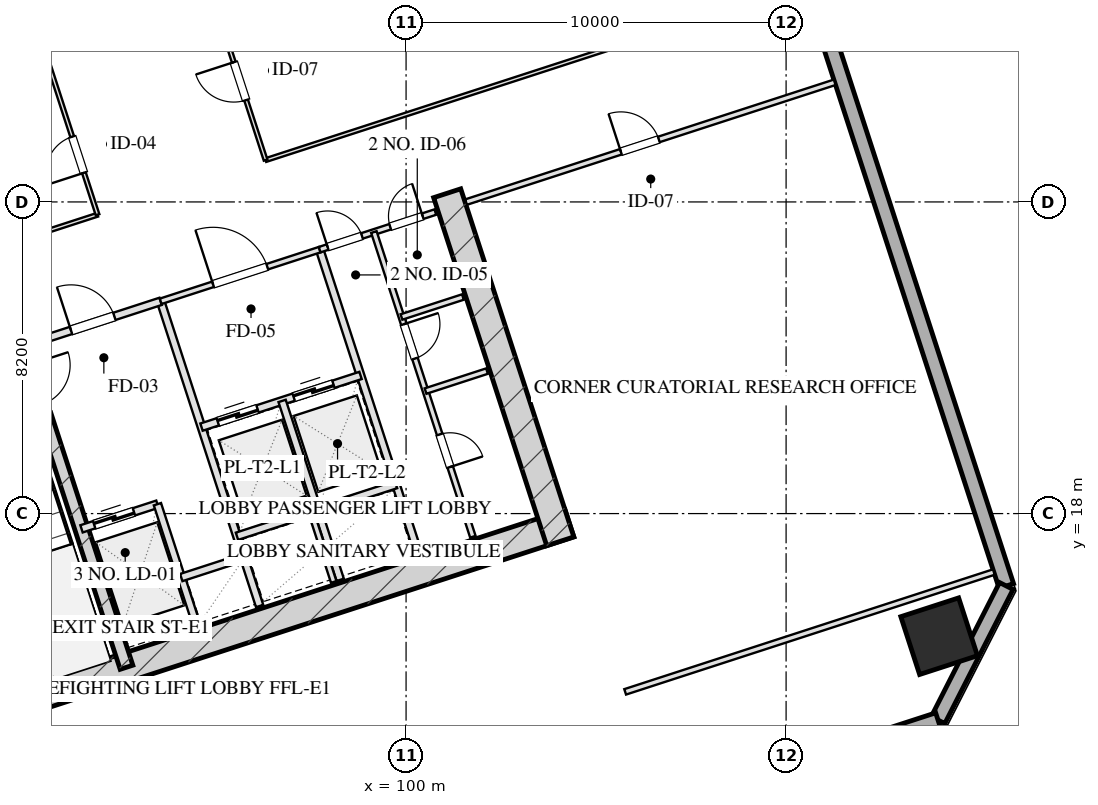
"""IFC4 building model, lengths in metres.
Left out: names, types, materials, properties, quantities, classifications, styles, units other than length and angle.
Written with IfcOpenShell. Run it as: python <this file> out.ifc"""

import sys

from ifc_helpers import new_model, si_unit, direction, frame, frame_2d, origin, origin_2d, place, context, subcontext, project, spatial, rectangle, hollow_rectangle, extrude, element, fill, save


model = new_model("IFC4")
c1 = context("Model", 3, precision=1e-05, world=origin(), true_north=direction((0.0, 1.0)))
c2 = subcontext(c1, "Body", "Model", "MODEL_VIEW")
j1 = project(units=[si_unit("LENGTHUNIT", "METRE"), si_unit("PLANEANGLEUNIT", "RADIAN")], contexts=[c1])
p1 = place(None, origin())
s1 = spatial("IfcSite", under=j1, at=p1, CompositionType="ELEMENT")
p2 = place(p1, origin())
s2 = spatial("IfcBuilding", under=s1, at=p2, CompositionType="ELEMENT")
p3 = place(p2, frame((0.0, 0.0, 42.0)))
s3 = spatial("IfcBuildingStorey", under=s2, at=p3, CompositionType="ELEMENT", Elevation=42.0)
p4 = place(p3, frame((88.559, 12.629, 0.0), z_axis=(0.0, 0.0, 1.0), x_axis=(0.951056072937, 0.309018358888, 0.0)))
e1 = element("IfcWall", 1, at=p4, inside=s3, PredefinedType="SHEAR", context=c2, shape_type="SweptSolid", body=[
    extrude(rectangle(XDim=16.55, YDim=0.75, at=frame_2d((8.275, 0.0))), origin(), (0.0, 0.0, 1.0), 4.0),
])
p5 = place(p3, frame((101.082, 26.429, 0.0), z_axis=(0.0, 0.0, 1.0), x_axis=(0.309016134813, -0.951056795583, 0.0)))
e2 = element("IfcWall", 2, at=p5, inside=s3, PredefinedType="SHEAR", context=c2, shape_type="SweptSolid", body=[
    extrude(rectangle(XDim=9.63, YDim=0.75, at=frame_2d((4.815, 0.0))), origin(), (0.0, 0.0, 1.0), 4.0),
])
p6 = place(p3, frame((90.486, 20.594, 0.0), z_axis=(0.0, 0.0, 1.0), x_axis=(0.309020428229, -0.951055400562, 0.0)))
e3 = element("IfcWall", 3, at=p6, inside=s3, PredefinedType="SHEAR", context=c2, shape_type="SweptSolid", body=[
    extrude(rectangle(XDim=6.98, YDim=0.35, at=frame_2d((3.49, 0.0))), origin(), (0.0, 0.0, 1.0), 4.0),
])
p7 = place(p3, frame((114.027, 14.774, 0.0), z_axis=(0.0, 0.0, 1.0), x_axis=(0.951056516295, 0.309016994375, 0.0)))
e4 = element("IfcColumn", 4, at=p7, inside=s3, PredefinedType="COLUMN", context=c2, shape_type="SweptSolid", body=[
    extrude(hollow_rectangle(XDim=1.6, YDim=1.6, WallThickness=0.055, at=origin_2d()), origin(), (0.0, 0.0, 1.0), 4.001),
])
p8 = place(p3, frame((100.345, 63.648, 0.0), z_axis=(0.0, 0.0, 1.0), x_axis=(0.309014526607, -0.951057318118, 0.0)))
e5 = element("IfcWall", 5, at=p8, inside=s3, PredefinedType="SOLIDWALL", context=c2, shape_type="SweptSolid", body=[
    extrude(rectangle(XDim=50.0, YDim=0.4, at=frame_2d((25.0, 0.0))), origin(), (0.0, 0.0, 1.0), 3.1),
])
p9 = place(p8, frame((30.15, 0.0, 0.75)))
e6 = element("IfcOpeningElement", 6, at=p9, cuts=e5, PredefinedType="OPENING", context=c2, shape_type="SweptSolid", body=[
    extrude(rectangle(XDim=2.5, YDim=1.75, at=frame_2d((1.25, 0.875))), frame((0.0, 0.21, 0.0), z_axis=(0.0, -1.0, 0.0), x_axis=(1.0, 0.0, 0.0)), (0.0, 0.0, 1.0), 0.42),
])
p10 = place(p8, frame((17.35, 0.0, 0.75)))
e7 = element("IfcOpeningElement", 7, at=p10, cuts=e5, PredefinedType="OPENING", context=c2, shape_type="SweptSolid", body=[
    extrude(rectangle(XDim=2.5, YDim=1.75, at=frame_2d((1.25, 0.875))), frame((0.0, 0.21, 0.0), z_axis=(0.0, -1.0, 0.0), x_axis=(1.0, 0.0, 0.0)), (0.0, 0.0, 1.0), 0.42),
])
p11 = place(p3, frame((115.795, 16.095, 0.0), z_axis=(0.0, 0.0, 1.0), x_axis=(-0.453958106755, -0.891023028497, 0.0)))
e8 = element("IfcWall", 8, at=p11, inside=s3, PredefinedType="SOLIDWALL", context=c2, shape_type="SweptSolid", body=[
    extrude(rectangle(XDim=3.96, YDim=0.4, at=frame_2d((1.98, 0.0))), origin(), (0.0, 0.0, 1.0), 3.1),
])
p12 = place(p3, frame((113.998, 12.567, 0.0), z_axis=(0.0, 0.0, 1.0), x_axis=(-0.951055939317, -0.309018770125, 0.0)))
e9 = element("IfcWall", 9, at=p12, inside=s3, PredefinedType="SOLIDWALL", context=c2, shape_type="SweptSolid", body=[
    extrude(rectangle(XDim=32.4, YDim=0.4, at=frame_2d((16.2, 0.0))), origin(), (0.0, 0.0, 1.0), 3.1),
])
p13 = place(p3, frame((93.542, 23.585, 0.0), z_axis=(0.0, 0.0, 1.0), x_axis=(0.309042196757, -0.951048327176, 0.0)))
e10 = element("IfcWall", 10, at=p13, inside=s3, PredefinedType="PARTITIONING", context=c2, shape_type="SweptSolid", body=[
    extrude(rectangle(XDim=8.43, YDim=0.2, at=frame_2d((4.215, 0.0))), origin(), (0.0, 0.0, 1.0), 3.705),
])
p14 = place(p3, frame((89.899, 22.401, 0.0), z_axis=(0.0, 0.0, 1.0), x_axis=(0.951046716504, 0.309047153403, 0.0)))
e11 = element("IfcWall", 11, at=p14, inside=s3, PredefinedType="PARTITIONING", context=c2, shape_type="SweptSolid", body=[
    extrude(rectangle(XDim=3.83, YDim=0.2, at=frame_2d((1.915, 0.0))), origin(), (0.0, 0.0, 1.0), 3.705),
])
p15 = place(p14, frame((1.35, 0.0, 0.0)))
e12 = element("IfcOpeningElement", 12, at=p15, cuts=e11, PredefinedType="OPENING", context=c2, shape_type="SweptSolid", body=[
    extrude(rectangle(XDim=1.2, YDim=2.05, at=frame_2d((0.6, 1.025))), frame((0.0, 0.11, 0.0), z_axis=(0.0, -1.0, 0.0), x_axis=(1.0, 0.0, 0.0)), (0.0, 0.0, 1.0), 0.22),
])
p16 = place(p3, frame((91.46, 17.598, 0.0), z_axis=(0.0, 0.0, 1.0), x_axis=(0.951062257173, 0.308999325213, 0.0)))
e13 = element("IfcWall", 13, at=p16, inside=s3, PredefinedType="PARTITIONING", context=c2, shape_type="SweptSolid", body=[
    extrude(rectangle(XDim=2.1, YDim=0.2, at=frame_2d((1.05, 0.0))), origin(), (0.0, 0.0, 1.0), 3.705),
])
p17 = place(p16, frame((0.35, 0.0, 0.0)))
e14 = element("IfcOpeningElement", 14, at=p17, cuts=e13, PredefinedType="OPENING", context=c2, shape_type="SweptSolid", body=[
    extrude(rectangle(XDim=1.1, YDim=2.05, at=frame_2d((0.55, 1.025))), frame((0.0, 0.11, 0.0), z_axis=(0.0, -1.0, 0.0), x_axis=(1.0, 0.0, 0.0)), (0.0, 0.0, 1.0), 0.22),
])
p18 = place(p3, frame((93.457, 18.247, 0.0), z_axis=(0.0, 0.0, 1.0), x_axis=(0.3089935693, -0.951064127245, 0.0)))
e15 = element("IfcWall", 15, at=p18, inside=s3, PredefinedType="PARTITIONING", context=c2, shape_type="SweptSolid", body=[
    extrude(rectangle(XDim=3.7, YDim=0.2, at=frame_2d((1.85, 0.0))), origin(), (0.0, 0.0, 1.0), 3.705),
])
p19 = place(p3, frame((94.084, 16.317, 0.0), z_axis=(0.0, 0.0, 1.0), x_axis=(0.951041328149, 0.309063734775, 0.0)))
e16 = element("IfcWall", 16, at=p19, inside=s3, PredefinedType="PARTITIONING", context=c2, shape_type="SweptSolid", body=[
    extrude(rectangle(XDim=1.73, YDim=0.2, at=frame_2d((0.865, 0.0))), origin(), (0.0, 0.0, 1.0), 3.705),
])
p20 = place(p3, frame((97.727, 24.944, 0.0), z_axis=(0.0, 0.0, 1.0), x_axis=(0.309016001439, -0.951056838919, 0.0)))
e17 = element("IfcWall", 17, at=p20, inside=s3, PredefinedType="PARTITIONING", context=c2, shape_type="SweptSolid", body=[
    extrude(rectangle(XDim=8.43, YDim=0.2, at=frame_2d((4.215, 0.0))), origin(), (0.0, 0.0, 1.0), 3.705),
])
p21 = place(p3, frame((93.542, 23.585, 0.0), z_axis=(0.0, 0.0, 1.0), x_axis=(0.951063829732, 0.308994485023, 0.0)))
e18 = element("IfcWall", 18, at=p21, inside=s3, PredefinedType="PARTITIONING", context=c2, shape_type="SweptSolid", body=[
    extrude(rectangle(XDim=4.4, YDim=0.15, at=frame_2d((2.2, 0.0))), origin(), (0.0, 0.0, 1.0), 3.705),
])
p22 = place(p21, frame((1.45, 0.0, 0.0)))
e19 = element("IfcOpeningElement", 19, at=p22, cuts=e18, PredefinedType="OPENING", context=c2, shape_type="SweptSolid", body=[
    extrude(rectangle(XDim=1.5, YDim=2.05, at=frame_2d((0.75, 1.025))), frame((0.0, 0.085, 0.0), z_axis=(0.0, -1.0, 0.0), x_axis=(1.0, 0.0, 0.0)), (0.0, 0.0, 1.0), 0.17),
])
p23 = place(p3, frame((94.617, 20.275, 0.0), z_axis=(0.0, 0.0, 1.0), x_axis=(0.951058531764, 0.30901079133, 0.0)))
e20 = element("IfcWall", 20, at=p23, inside=s3, PredefinedType="PARTITIONING", context=c2, shape_type="SweptSolid", body=[
    extrude(rectangle(XDim=4.4, YDim=0.2, at=frame_2d((2.2, 0.0))), origin(), (0.0, 0.0, 1.0), 3.705),
])
p24 = place(p23, frame((0.45, 0.0, 0.0)))
e21 = element("IfcOpeningElement", 21, at=p24, cuts=e20, PredefinedType="OPENING", context=c2, shape_type="SweptSolid", body=[
    extrude(rectangle(XDim=1.1, YDim=2.05, at=frame_2d((0.55, 1.025))), frame((0.0, 0.11, 0.0), z_axis=(0.0, -1.0, 0.0), x_axis=(1.0, 0.0, 0.0)), (0.0, 0.0, 1.0), 0.22),
])
p25 = place(p23, frame((2.55, 0.0, 0.0)))
e22 = element("IfcOpeningElement", 22, at=p25, cuts=e20, PredefinedType="OPENING", context=c2, shape_type="SweptSolid", body=[
    extrude(rectangle(XDim=1.1, YDim=2.05, at=frame_2d((0.55, 1.025))), frame((0.0, 0.11, 0.0), z_axis=(0.0, -1.0, 0.0), x_axis=(1.0, 0.0, 0.0)), (0.0, 0.0, 1.0), 0.22),
])
p26 = place(p3, frame((96.738, 20.964, 0.0), z_axis=(0.0, 0.0, 1.0), x_axis=(0.309042578481, -0.951048203135, 0.0)))
e23 = element("IfcWall", 23, at=p26, inside=s3, PredefinedType="PARTITIONING", context=c2, shape_type="SweptSolid", body=[
    extrude(rectangle(XDim=4.95, YDim=0.2, at=frame_2d((2.475, 0.0))), origin(), (0.0, 0.0, 1.0), 3.705),
])
p27 = place(p3, frame((95.551, 17.403, 0.0), z_axis=(0.0, 0.0, 1.0), x_axis=(0.951058531764, 0.30901079133, 0.0)))
e24 = element("IfcWall", 24, at=p27, inside=s3, PredefinedType="PARTITIONING", context=c2, shape_type="SweptSolid", body=[
    extrude(rectangle(XDim=4.4, YDim=0.2, at=frame_2d((2.2, 0.0))), origin(), (0.0, 0.0, 1.0), 3.705),
])
p28 = place(p3, frame((97.516, 17.989, 0.0), z_axis=(0.0, 0.0, 1.0), x_axis=(0.30897153969, -0.951071284217, 0.0)))
e25 = element("IfcWall", 25, at=p28, inside=s3, PredefinedType="PARTITIONING", context=c2, shape_type="SweptSolid", body=[
    extrude(rectangle(XDim=1.88, YDim=0.15, at=frame_2d((0.94, 0.0))), origin(), (0.0, 0.0, 1.0), 3.705),
])
p29 = place(p3, frame((97.727, 24.944, 0.0), z_axis=(0.0, 0.0, 1.0), x_axis=(0.951036872128, 0.309077446369, 0.0)))
e26 = element("IfcWall", 26, at=p29, inside=s3, PredefinedType="PARTITIONING", context=c2, shape_type="SweptSolid", body=[
    extrude(rectangle(XDim=3.2, YDim=0.15, at=frame_2d((1.6, 0.0))), origin(), (0.0, 0.0, 1.0), 3.705),
])
p30 = place(p29, frame((0.22, 0.0, 0.0)))
e27 = element("IfcOpeningElement", 27, at=p30, cuts=e26, PredefinedType="OPENING", context=c2, shape_type="SweptSolid", body=[
    extrude(rectangle(XDim=0.95, YDim=2.05, at=frame_2d((0.475, 1.025))), frame((0.0, 0.085, 0.0), z_axis=(0.0, -1.0, 0.0), x_axis=(1.0, 0.0, 0.0)), (0.0, 0.0, 1.0), 0.17),
])
p31 = place(p29, frame((1.95, 0.0, 0.0)))
e28 = element("IfcOpeningElement", 28, at=p31, cuts=e26, PredefinedType="OPENING", context=c2, shape_type="SweptSolid", body=[
    extrude(rectangle(XDim=0.9, YDim=2.05, at=frame_2d((0.45, 1.025))), frame((0.0, 0.085, 0.0), z_axis=(0.0, -1.0, 0.0), x_axis=(1.0, 0.0, 0.0)), (0.0, 0.0, 1.0), 0.17),
])
p32 = place(p3, frame((99.153, 25.408, 0.0), z_axis=(0.0, 0.0, 1.0), x_axis=(0.309016001439, -0.951056838919, 0.0)))
e29 = element("IfcWall", 29, at=p32, inside=s3, PredefinedType="PARTITIONING", context=c2, shape_type="SweptSolid", body=[
    extrude(rectangle(XDim=8.43, YDim=0.15, at=frame_2d((4.215, 0.0))), origin(), (0.0, 0.0, 1.0), 3.705),
])
p33 = place(p32, frame((2.55, 0.0, 0.0)))
e30 = element("IfcOpeningElement", 30, at=p33, cuts=e29, PredefinedType="OPENING", context=c2, shape_type="SweptSolid", body=[
    extrude(rectangle(XDim=0.95, YDim=2.05, at=frame_2d((0.475, 1.025))), frame((0.0, 0.085, 0.0), z_axis=(0.0, -1.0, 0.0), x_axis=(1.0, 0.0, 0.0)), (0.0, 0.0, 1.0), 0.17),
])
p34 = place(p32, frame((5.6, 0.0, 0.0)))
e31 = element("IfcOpeningElement", 31, at=p34, cuts=e29, PredefinedType="OPENING", context=c2, shape_type="SweptSolid", body=[
    extrude(rectangle(XDim=0.9, YDim=2.05, at=frame_2d((0.45, 1.025))), frame((0.0, 0.085, 0.0), z_axis=(0.0, -1.0, 0.0), x_axis=(1.0, 0.0, 0.0)), (0.0, 0.0, 1.0), 0.17),
])
for number, where, z_axis, x_axis in (
    (32, (100.513, 21.223, 0.0), (0.0, 0.0, 1.0), (0.951, 0.309, 0.0)),
    (33, (99.879, 23.173, 0.0), (0.0, 0.0, 1.0), (0.951, 0.309, 0.0)),
):
    element("IfcWall", number, at=place(p3, frame(where, z_axis=z_axis, x_axis=x_axis)), inside=s3, PredefinedType="PARTITIONING", context=c2, shape_type="SweptSolid", body=[
        extrude(rectangle(XDim=1.7, YDim=0.15, at=frame_2d((0.85, 0.0))), origin(), (0.0, 0.0, 1.0), 3.705),
    ])
p35 = place(p3, frame((105.765, 13.309, 0.0), z_axis=(0.0, 0.0, 1.0), x_axis=(0.951054294345, 0.309023832749, 0.0)))
e34 = element("IfcWall", 34, at=p35, inside=s3, PredefinedType="PARTITIONING", context=c2, shape_type="SweptSolid", body=[
    extrude(rectangle(XDim=10.2, YDim=0.15, at=frame_2d((5.1, 0.0))), origin(), (0.0, 0.0, 1.0), 3.705),
])
p36 = place(p3, frame((101.578, 26.196, 0.0), z_axis=(0.0, 0.0, 1.0), x_axis=(0.951059043131, 0.309009217467, 0.0)))
e35 = element("IfcWall", 35, at=p36, inside=s3, PredefinedType="PARTITIONING", context=c2, shape_type="SweptSolid", body=[
    extrude(rectangle(XDim=10.2, YDim=0.15, at=frame_2d((5.1, 0.0))), origin(), (0.0, 0.0, 1.0), 3.705),
])
p37 = place(p36, frame((4.284, 0.0, 0.0)))
e36 = element("IfcOpeningElement", 36, at=p37, cuts=e35, PredefinedType="OPENING", context=c2, shape_type="SweptSolid", body=[
    extrude(rectangle(XDim=1.05, YDim=2.05, at=frame_2d((0.525, 1.025))), frame((0.0, 0.085, 0.0), z_axis=(0.0, -1.0, 0.0), x_axis=(1.0, 0.0, 0.0)), (0.0, 0.0, 1.0), 0.17),
])
p38 = place(p3, frame((74.691, 20.278, 0.0), z_axis=(0.0, 0.0, 1.0), x_axis=(0.951053521786, 0.309026210375, 0.0)))
e37 = element("IfcWall", 37, at=p38, inside=s3, PredefinedType="MOVABLE", context=c2, shape_type="SweptSolid", body=[
    extrude(rectangle(XDim=18.075, YDim=0.1, at=frame_2d((9.038, 0.0))), origin(), (0.0, 0.0, 1.0), 3.705),
])
p39 = place(p3, frame((96.304, 27.3, 0.0), z_axis=(0.0, 0.0, 1.0), x_axis=(0.951055535739, 0.309020012199, 0.0)))
e38 = element("IfcWall", 38, at=p39, inside=s3, PredefinedType="MOVABLE", context=c2, shape_type="SweptSolid", body=[
    extrude(rectangle(XDim=14.875, YDim=0.1, at=frame_2d((7.438, 0.0))), origin(), (0.0, 0.0, 1.0), 3.705),
])
p40 = place(p3, frame((91.882, 25.863, 0.0), z_axis=(0.0, 0.0, 1.0), x_axis=(-0.309022042254, 0.951054876125, 0.0)))
e39 = element("IfcWall", 39, at=p40, inside=s3, PredefinedType="MOVABLE", context=c2, shape_type="SweptSolid", body=[
    extrude(rectangle(XDim=16.64, YDim=0.1, at=frame_2d((8.32, 0.0))), origin(), (0.0, 0.0, 1.0), 3.705),
])
p41 = place(p40, frame((1.16, 0.0, 0.0)))
e40 = element("IfcOpeningElement", 40, at=p41, cuts=e39, PredefinedType="OPENING", context=c2, shape_type="SweptSolid", body=[
    extrude(rectangle(XDim=1.0, YDim=2.05, at=frame_2d((0.5, 1.025))), frame((0.0, 0.06, 0.0), z_axis=(0.0, -1.0, 0.0), x_axis=(1.0, 0.0, 0.0)), (0.0, 0.0, 1.0), 0.12),
])
p42 = place(p40, frame((6.16, 0.0, 0.0)))
e41 = element("IfcOpeningElement", 41, at=p42, cuts=e39, PredefinedType="OPENING", context=c2, shape_type="SweptSolid", body=[
    extrude(rectangle(XDim=1.0, YDim=2.05, at=frame_2d((0.5, 1.025))), frame((0.0, 0.06, 0.0), z_axis=(0.0, -1.0, 0.0), x_axis=(1.0, 0.0, 0.0)), (0.0, 0.0, 1.0), 0.12),
])
p43 = place(p40, frame((10.16, 0.0, 0.0)))
e42 = element("IfcOpeningElement", 42, at=p43, cuts=e39, PredefinedType="OPENING", context=c2, shape_type="SweptSolid", body=[
    extrude(rectangle(XDim=0.85, YDim=2.05, at=frame_2d((0.425, 1.025))), frame((0.0, 0.06, 0.0), z_axis=(0.0, -1.0, 0.0), x_axis=(1.0, 0.0, 0.0)), (0.0, 0.0, 1.0), 0.12),
])
p44 = place(p40, frame((14.48, 0.0, 0.0)))
e43 = element("IfcOpeningElement", 43, at=p44, cuts=e39, PredefinedType="OPENING", context=c2, shape_type="SweptSolid", body=[
    extrude(rectangle(XDim=1.0, YDim=2.05, at=frame_2d((0.5, 1.025))), frame((0.0, 0.06, 0.0), z_axis=(0.0, -1.0, 0.0), x_axis=(1.0, 0.0, 0.0)), (0.0, 0.0, 1.0), 0.12),
])
p45 = place(p3, frame((96.304, 27.3, 0.0), z_axis=(0.0, 0.0, 1.0), x_axis=(-0.30901773025, 0.951056277195, 0.0)))
e44 = element("IfcWall", 44, at=p45, inside=s3, PredefinedType="MOVABLE", context=c2, shape_type="SweptSolid", body=[
    extrude(rectangle(XDim=16.64, YDim=0.1, at=frame_2d((8.32, 0.0))), origin(), (0.0, 0.0, 1.0), 3.705),
])
p46 = place(p45, frame((1.66, 0.0, 0.0)))
e45 = element("IfcOpeningElement", 45, at=p46, cuts=e44, PredefinedType="OPENING", context=c2, shape_type="SweptSolid", body=[
    extrude(rectangle(XDim=1.05, YDim=2.05, at=frame_2d((0.525, 1.025))), frame((0.0, 0.06, 0.0), z_axis=(0.0, -1.0, 0.0), x_axis=(1.0, 0.0, 0.0)), (0.0, 0.0, 1.0), 0.12),
])
p47 = place(p45, frame((7.82, 0.0, 0.0)))
e46 = element("IfcOpeningElement", 46, at=p47, cuts=e44, PredefinedType="OPENING", context=c2, shape_type="SweptSolid", body=[
    extrude(rectangle(XDim=1.0, YDim=2.05, at=frame_2d((0.5, 1.025))), frame((0.0, 0.06, 0.0), z_axis=(0.0, -1.0, 0.0), x_axis=(1.0, 0.0, 0.0)), (0.0, 0.0, 1.0), 0.12),
])
p48 = place(p45, frame((13.98, 0.0, 0.0)))
e47 = element("IfcOpeningElement", 47, at=p48, cuts=e44, PredefinedType="OPENING", context=c2, shape_type="SweptSolid", body=[
    extrude(rectangle(XDim=1.0, YDim=2.05, at=frame_2d((0.5, 1.025))), frame((0.0, 0.06, 0.0), z_axis=(0.0, -1.0, 0.0), x_axis=(1.0, 0.0, 0.0)), (0.0, 0.0, 1.0), 0.12),
])
p49 = place(p15, origin())
e48 = element("IfcDoor", 48, at=p49, inside=s3, OperationType="SINGLE_SWING_LEFT", PredefinedType="DOOR", context=c2, shape_type="SweptSolid", body=[
    extrude(rectangle(XDim=1.2, YDim=2.05, at=frame_2d((0.6, 1.025))), frame((0.0, 0.025, 0.0), z_axis=(0.0, -1.0, 0.0), x_axis=(1.0, 0.0, 0.0)), (0.0, 0.0, 1.0), 0.05),
])
fill(e12, e48)
p50 = place(p17, origin())
e49 = element("IfcDoor", 49, at=p50, inside=s3, OperationType="DOUBLE_DOOR_SLIDING", PredefinedType="DOOR", context=c2, shape_type="SweptSolid", body=[
    extrude(rectangle(XDim=1.1, YDim=2.05, at=frame_2d((0.55, 1.025))), frame((0.0, 0.025, 0.0), z_axis=(0.0, -1.0, 0.0), x_axis=(1.0, 0.0, 0.0)), (0.0, 0.0, 1.0), 0.05),
])
fill(e14, e49)
p51 = place(p22, origin())
e50 = element("IfcDoor", 50, at=p51, inside=s3, OperationType="SINGLE_SWING_LEFT", PredefinedType="DOOR", context=c2, shape_type="SweptSolid", body=[
    extrude(rectangle(XDim=1.5, YDim=2.05, at=frame_2d((0.75, 1.025))), frame((0.0, 0.025, 0.0), z_axis=(0.0, -1.0, 0.0), x_axis=(1.0, 0.0, 0.0)), (0.0, 0.0, 1.0), 0.05),
])
fill(e19, e50)
p52 = place(p24, origin())
e51 = element("IfcDoor", 51, at=p52, inside=s3, OperationType="DOUBLE_DOOR_SLIDING", PredefinedType="DOOR", context=c2, shape_type="SweptSolid", body=[
    extrude(rectangle(XDim=1.1, YDim=2.05, at=frame_2d((0.55, 1.025))), frame((0.0, 0.025, 0.0), z_axis=(0.0, -1.0, 0.0), x_axis=(1.0, 0.0, 0.0)), (0.0, 0.0, 1.0), 0.05),
])
fill(e21, e51)
p53 = place(p25, origin())
e52 = element("IfcDoor", 52, at=p53, inside=s3, OperationType="DOUBLE_DOOR_SLIDING", PredefinedType="DOOR", context=c2, shape_type="SweptSolid", body=[
    extrude(rectangle(XDim=1.1, YDim=2.05, at=frame_2d((0.55, 1.025))), frame((0.0, 0.025, 0.0), z_axis=(0.0, -1.0, 0.0), x_axis=(1.0, 0.0, 0.0)), (0.0, 0.0, 1.0), 0.05),
])
fill(e22, e52)
p54 = place(p30, origin())
e53 = element("IfcDoor", 53, at=p54, inside=s3, OperationType="SINGLE_SWING_LEFT", PredefinedType="DOOR", context=c2, shape_type="SweptSolid", body=[
    extrude(rectangle(XDim=0.95, YDim=2.05, at=frame_2d((0.475, 1.025))), frame((0.0, 0.025, 0.0), z_axis=(0.0, -1.0, 0.0), x_axis=(1.0, 0.0, 0.0)), (0.0, 0.0, 1.0), 0.05),
])
fill(e27, e53)
p55 = place(p31, origin())
e54 = element("IfcDoor", 54, at=p55, inside=s3, OperationType="SINGLE_SWING_RIGHT", PredefinedType="DOOR", context=c2, shape_type="SweptSolid", body=[
    extrude(rectangle(XDim=0.9, YDim=2.05, at=frame_2d((0.45, 1.025))), frame((0.0, 0.025, 0.0), z_axis=(0.0, -1.0, 0.0), x_axis=(1.0, 0.0, 0.0)), (0.0, 0.0, 1.0), 0.05),
])
fill(e28, e54)
p56 = place(p33, origin())
e55 = element("IfcDoor", 55, at=p56, inside=s3, OperationType="SINGLE_SWING_LEFT", PredefinedType="DOOR", context=c2, shape_type="SweptSolid", body=[
    extrude(rectangle(XDim=0.95, YDim=2.05, at=frame_2d((0.475, 1.025))), frame((0.0, 0.025, 0.0), z_axis=(0.0, -1.0, 0.0), x_axis=(1.0, 0.0, 0.0)), (0.0, 0.0, 1.0), 0.05),
])
fill(e30, e55)
p57 = place(p34, origin())
e56 = element("IfcDoor", 56, at=p57, inside=s3, OperationType="SINGLE_SWING_RIGHT", PredefinedType="DOOR", context=c2, shape_type="SweptSolid", body=[
    extrude(rectangle(XDim=0.9, YDim=2.05, at=frame_2d((0.45, 1.025))), frame((0.0, 0.025, 0.0), z_axis=(0.0, -1.0, 0.0), x_axis=(1.0, 0.0, 0.0)), (0.0, 0.0, 1.0), 0.05),
])
fill(e31, e56)
p58 = place(p37, origin())
e57 = element("IfcDoor", 57, at=p58, inside=s3, OperationType="SINGLE_SWING_LEFT", PredefinedType="DOOR", context=c2, shape_type="SweptSolid", body=[
    extrude(rectangle(XDim=1.05, YDim=2.05, at=frame_2d((0.525, 1.025))), frame((0.0, 0.025, 0.0), z_axis=(0.0, -1.0, 0.0), x_axis=(1.0, 0.0, 0.0)), (0.0, 0.0, 1.0), 0.05),
])
fill(e36, e57)
p59 = place(p41, origin())
e58 = element("IfcDoor", 58, at=p59, inside=s3, OperationType="SINGLE_SWING_LEFT", PredefinedType="DOOR", context=c2, shape_type="SweptSolid", body=[
    extrude(rectangle(XDim=1.0, YDim=2.05, at=frame_2d((0.5, 1.025))), frame((0.0, 0.025, 0.0), z_axis=(0.0, -1.0, 0.0), x_axis=(1.0, 0.0, 0.0)), (0.0, 0.0, 1.0), 0.05),
])
fill(e40, e58)
p60 = place(p46, origin())
e59 = element("IfcDoor", 59, at=p60, inside=s3, OperationType="SINGLE_SWING_RIGHT", PredefinedType="DOOR", context=c2, shape_type="SweptSolid", body=[
    extrude(rectangle(XDim=1.05, YDim=2.05, at=frame_2d((0.525, 1.025))), frame((0.0, 0.025, 0.0), z_axis=(0.0, -1.0, 0.0), x_axis=(1.0, 0.0, 0.0)), (0.0, 0.0, 1.0), 0.05),
])
fill(e45, e59)
save(model, sys.argv[1])
